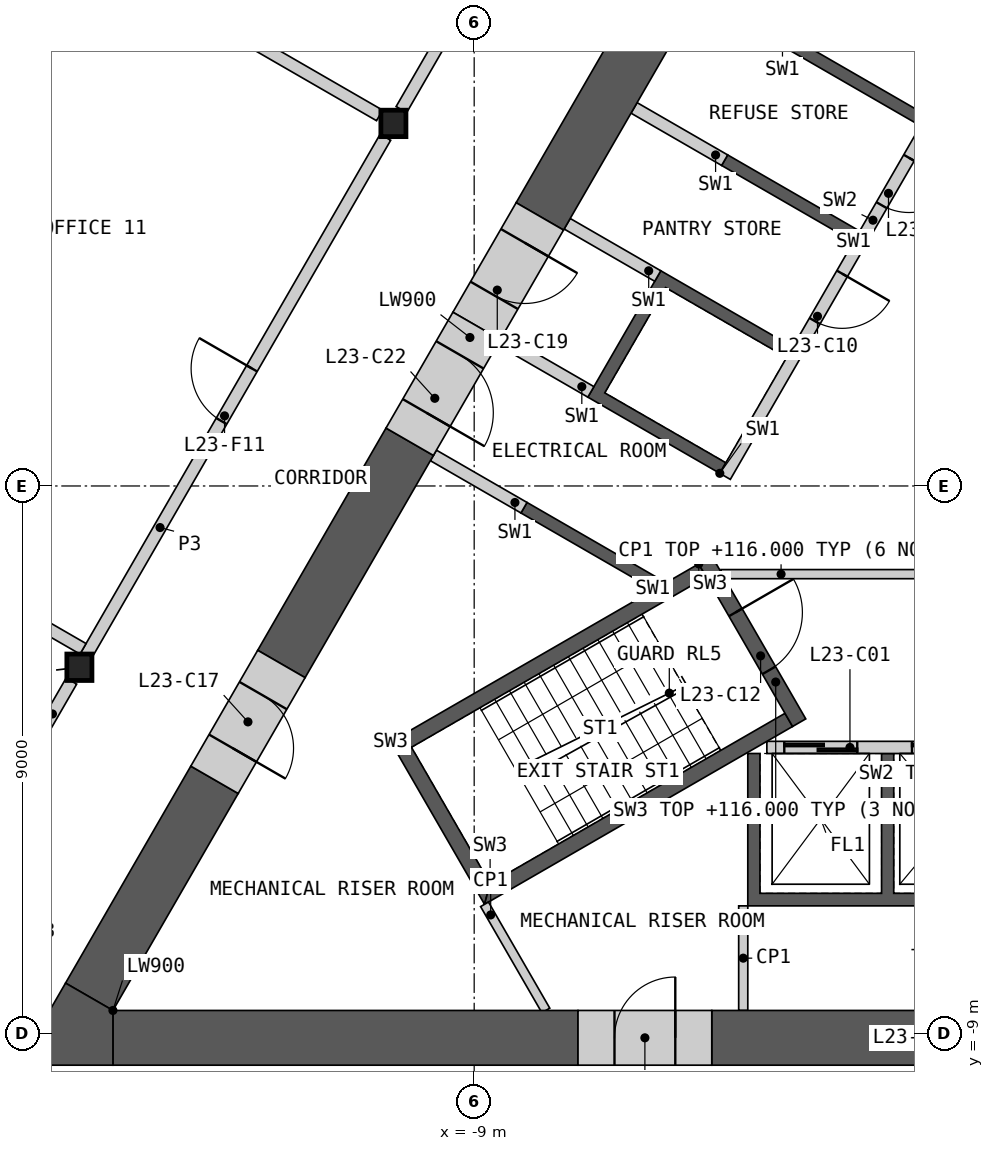
"""IFC4 building model, lengths in metres.
Left out: names, types, materials, properties, quantities, classifications, styles, units other than length and angle.
Written with IfcOpenShell. Run it as: python <this file> out.ifc"""

import sys

from ifc_helpers import new_model, si_unit, direction, frame, frame_2d, origin, origin_2d, place, context, subcontext, project, spatial, polyline, rectangle, i_section, outline, extrude, element, fill, save


model = new_model("IFC4")
c1 = context("Model", 3, precision=1e-05, world=origin(), true_north=direction((0.0, 1.0)))
c2 = subcontext(c1, "Body", "Model", "MODEL_VIEW")
j1 = project(units=[si_unit("LENGTHUNIT", "METRE"), si_unit("PLANEANGLEUNIT", "RADIAN")], contexts=[c1])
p1 = place(None, origin())
s1 = spatial("IfcSite", under=j1, at=p1, CompositionType="ELEMENT")
p2 = place(p1, origin())
s2 = spatial("IfcBuilding", under=s1, at=p2, CompositionType="ELEMENT")
p3 = place(p2, frame((0.0, 0.0, 112.2)))
s3 = spatial("IfcBuildingStorey", under=s2, at=p3, CompositionType="ELEMENT", Elevation=112.2)
for number, where, z_axis, x_axis in (
    (1, (-10.328, 5.963, 0.0), (0.0, 0.0, 1.0), (1.0, 0.0, 0.0)),
    (2, (-15.493, -2.982, 0.0), (0.0, 0.0, 1.0), (1.0, 0.0, 0.0)),
):
    element("IfcColumn", number, at=place(p3, frame(where, z_axis=z_axis, x_axis=x_axis)), inside=s3, PredefinedType="COLUMN", context=c2, shape_type="SweptSolid", body=[
        extrude(i_section(OverallWidth=0.412, OverallDepth=0.435, WebThickness=0.036, FlangeThickness=0.057, at=origin_2d()), origin(), (0.0, 0.0, 1.0), 4.2),
    ])
p4 = place(p3, origin())
e3 = element("IfcWall", 3, at=p4, inside=s3, PredefinedType="SHEAR", context=c2, shape_type="SweptSolid", body=[
    extrude(outline(polyline([(4.5, -4.4), (4.5, -6.906), (-4.5, -6.906), (-4.5, -4.4), (-4.3, -4.4), (-4.3, -6.7), (-2.3, -6.7), (-2.3, -4.4), (-2.1, -4.4), (-2.1, -6.7), (-0.1, -6.7), (-0.1, -4.4), (0.1, -4.4), (0.1, -6.7), (2.1, -6.7), (2.1, -4.4), (2.3, -4.4), (2.3, -6.7), (4.3, -6.7), (4.3, -4.4), (4.5, -4.4)])), origin(), (0.0, 0.0, 1.0), 3.8),
])
p5 = place(p3, frame((-4.187, -4.3, 0.0), z_axis=(0.0, 0.0, 1.0), x_axis=(1.0, 0.0, 0.0)))
e4 = element("IfcWall", 4, at=p5, inside=s3, PredefinedType="SOLIDWALL", context=c2, shape_type="SweptSolid", body=[
    extrude(rectangle(XDim=8.373, YDim=0.2, at=frame_2d((4.187, 0.0))), origin(), (0.0, 0.0, 1.0), 3.8),
])
p6 = place(p5, frame((0.287, 0.0, 0.0)))
e5 = element("IfcOpeningElement", 5, at=p6, cuts=e4, PredefinedType="OPENING", context=c2, shape_type="SweptSolid", body=[
    extrude(rectangle(XDim=1.2, YDim=2.1, at=frame_2d((0.6, 1.05))), frame((0.0, 0.11, 0.0), z_axis=(0.0, -1.0, 0.0), x_axis=(1.0, 0.0, 0.0)), (0.0, 0.0, 1.0), 0.22),
])
p7 = place(p5, frame((2.387, 0.0, 0.0)))
e6 = element("IfcOpeningElement", 6, at=p7, cuts=e4, PredefinedType="OPENING", context=c2, shape_type="SweptSolid", body=[
    extrude(rectangle(XDim=1.4, YDim=2.1, at=frame_2d((0.7, 1.05))), frame((0.0, 0.11, 0.0), z_axis=(0.0, -1.0, 0.0), x_axis=(1.0, 0.0, 0.0)), (0.0, 0.0, 1.0), 0.22),
])
p8 = place(p5, frame((4.737, 0.0, 0.0)))
e7 = element("IfcOpeningElement", 7, at=p8, cuts=e4, PredefinedType="OPENING", context=c2, shape_type="SweptSolid", body=[
    extrude(rectangle(XDim=1.1, YDim=2.1, at=frame_2d((0.55, 1.05))), frame((0.0, 0.11, 0.0), z_axis=(0.0, -1.0, 0.0), x_axis=(1.0, 0.0, 0.0)), (0.0, 0.0, 1.0), 0.22),
])
p9 = place(p5, frame((6.887, 0.0, 0.0)))
e8 = element("IfcOpeningElement", 8, at=p9, cuts=e4, PredefinedType="OPENING", context=c2, shape_type="SweptSolid", body=[
    extrude(rectangle(XDim=1.2, YDim=2.1, at=frame_2d((0.6, 1.05))), frame((0.0, 0.11, 0.0), z_axis=(0.0, -1.0, 0.0), x_axis=(1.0, 0.0, 0.0)), (0.0, 0.0, 1.0), 0.22),
])
p10 = place(p3, origin())
e9 = element("IfcWall", 9, at=p10, inside=s3, PredefinedType="SHEAR", context=c2, shape_type="SweptSolid", body=[
    extrude(outline(polyline([(-6.061, -1.697), (-8.231, -0.444), (-8.131, -0.271), (-5.96, -1.524), (-6.061, -1.697)])), origin(), (0.0, 0.0, 1.0), 3.8),
])
p11 = place(p3, origin())
e10 = element("IfcWall", 10, at=p11, inside=s3, PredefinedType="SHEAR", context=c2, shape_type="SweptSolid", body=[
    extrude(outline(polyline([(-4.96, 0.208), (-7.131, 1.461), (-5.931, 3.54), (-3.76, 2.287), (-3.861, 2.113), (-5.852, 3.263), (-6.852, 1.531), (-4.861, 0.381), (-4.96, 0.208)])), origin(), (0.0, 0.0, 1.0), 3.8),
])
p12 = place(p3, origin())
e11 = element("IfcWall", 11, at=p12, inside=s3, PredefinedType="SHEAR", context=c2, shape_type="SweptSolid", body=[
    extrude(outline(polyline([(-2.76, 4.019), (-4.931, 5.272), (-4.831, 5.445), (-2.66, 4.192), (-2.76, 4.019)])), origin(), (0.0, 0.0, 1.0), 3.8),
])
p13 = place(p3, origin())
e12 = element("IfcWall", 12, at=p13, inside=s3, PredefinedType="SHEAR", context=c2, shape_type="SweptSolid", body=[
    extrude(outline(polyline([(-3.731, 7.35), (-1.561, 6.097), (-1.66, 5.924), (-3.831, 7.177), (-3.731, 7.35)])), origin(), (0.0, 0.0, 1.0), 3.8),
])
p14 = place(p3, frame((-1.631, 5.776, 0.0), z_axis=(0.0, 0.0, 1.0), x_axis=(-0.499992876559, -0.866029516466, 0.0)))
e13 = element("IfcWall", 13, at=p14, inside=s3, PredefinedType="SOLIDWALL", context=c2, shape_type="SweptSolid", body=[
    extrude(rectangle(XDim=6.486, YDim=0.2, at=frame_2d((3.243, 0.0))), origin(), (0.0, 0.0, 1.0), 3.8),
])
p15 = place(p14, frame((0.437, 0.0, 0.0)))
e14 = element("IfcOpeningElement", 14, at=p15, cuts=e13, PredefinedType="OPENING", context=c2, shape_type="SweptSolid", body=[
    extrude(rectangle(XDim=0.9, YDim=2.1, at=frame_2d((0.45, 1.05))), frame((0.0, 0.11, 0.0), z_axis=(0.0, -1.0, 0.0), x_axis=(1.0, 0.0, 0.0)), (0.0, 0.0, 1.0), 0.22),
])
p16 = place(p14, frame((2.637, 0.0, 0.0)))
e15 = element("IfcOpeningElement", 15, at=p16, cuts=e13, PredefinedType="OPENING", context=c2, shape_type="SweptSolid", body=[
    extrude(rectangle(XDim=0.9, YDim=2.1, at=frame_2d((0.45, 1.05))), frame((0.0, 0.11, 0.0), z_axis=(0.0, -1.0, 0.0), x_axis=(1.0, 0.0, 0.0)), (0.0, 0.0, 1.0), 0.22),
])
p17 = place(p3, frame((-4.881, 5.358, 0.0), z_axis=(0.0, 0.0, 1.0), x_axis=(-0.866024871741, 0.500000921525, 0.0)))
e16 = element("IfcWall", 16, at=p17, inside=s3, PredefinedType="SHEAR", context=c2, shape_type="SweptSolid", body=[
    extrude(rectangle(XDim=1.72, YDim=0.2, at=frame_2d((0.86, 0.0))), origin(), (0.0, 0.0, 1.0), 3.8),
])
p18 = place(p3, frame((-5.981, 3.453, 0.0), z_axis=(0.0, 0.0, 1.0), x_axis=(-0.866060346521, 0.499939472521, 0.0)))
e17 = element("IfcWall", 17, at=p18, inside=s3, PredefinedType="SHEAR", context=c2, shape_type="SweptSolid", body=[
    extrude(rectangle(XDim=1.72, YDim=0.2, at=frame_2d((0.86, 0.0))), origin(), (0.0, 0.0, 1.0), 3.8),
])
for number, where, z_axis, x_axis in (
    (18, (-7.081, 1.548, 0.0), (0.0, 0.0, 1.0), (-0.866, 0.5, 0.0)),
    (19, (-8.181, -0.357, 0.0), (0.0, 0.0, 1.0), (-0.866, 0.5, 0.0)),
):
    element("IfcWall", number, at=place(p3, frame(where, z_axis=z_axis, x_axis=x_axis)), inside=s3, PredefinedType="SHEAR", context=c2, shape_type="SweptSolid", body=[
        extrude(rectangle(XDim=1.72, YDim=0.2, at=frame_2d((0.86, 0.0))), origin(), (0.0, 0.0, 1.0), 3.8),
    ])
p19 = place(p3, frame((-4.941, -1.45, 0.0), z_axis=(0.0, 0.0, 1.0), x_axis=(1.0, 0.0, 0.0)))
e20 = element("IfcWall", 20, at=p19, inside=s3, PredefinedType="PARTITIONING", context=c2, shape_type="SweptSolid", body=[
    extrude(rectangle(XDim=9.882, YDim=0.15, at=frame_2d((4.941, 0.0))), origin(), (0.0, 0.0, 1.0), 3.8),
])
p20 = place(p19, frame((4.391, 0.0, 0.0)))
e21 = element("IfcOpeningElement", 21, at=p20, cuts=e20, PredefinedType="OPENING", context=c2, shape_type="SweptSolid", body=[
    extrude(rectangle(XDim=1.1, YDim=2.1, at=frame_2d((0.55, 1.05))), frame((0.0, 0.085, 0.0), z_axis=(0.0, -1.0, 0.0), x_axis=(1.0, 0.0, 0.0)), (0.0, 0.0, 1.0), 0.17),
])
p21 = place(p3, origin())
e22 = element("IfcWall", 22, at=p21, inside=s3, PredefinedType="SHEAR", context=c2, shape_type="SweptSolid", body=[
    extrude(outline(polyline([(-5.307, -1.281), (-10.374, -4.206), (-10.032, -4.298), (-5.182, -1.498), (-5.307, -1.281)])), origin(), (0.0, 0.0, 1.0), 3.8),
])
p22 = place(p3, origin())
e23 = element("IfcWall", 23, at=p22, inside=s3, PredefinedType="SHEAR", context=c2, shape_type="SweptSolid", body=[
    extrude(outline(polyline([(-10.374, -4.206), (-8.83, -6.881), (-8.738, -6.539), (-10.032, -4.298), (-10.374, -4.206)])), origin(), (0.0, 0.0, 1.0), 3.8),
])
p23 = place(p3, origin())
e24 = element("IfcWall", 24, at=p23, inside=s3, PredefinedType="SHEAR", context=c2, shape_type="SweptSolid", body=[
    extrude(outline(polyline([(-8.738, -6.539), (-8.83, -6.881), (-3.763, -3.956), (-3.888, -3.739), (-8.738, -6.539)])), origin(), (0.0, 0.0, 1.0), 3.8),
])
p24 = place(p3, frame((-5.199, -1.219, 0.0), z_axis=(0.0, 0.0, 1.0), x_axis=(0.499982516597, -0.866035497597, 0.0)))
e25 = element("IfcWall", 25, at=p24, inside=s3, PredefinedType="SHEAR", context=c2, shape_type="SweptSolid", body=[
    extrude(rectangle(XDim=3.088, YDim=0.25, at=frame_2d((1.544, 0.0))), origin(), (0.0, 0.0, 1.0), 3.8),
])
p25 = place(p24, frame((0.994, 0.0, 0.0)))
e26 = element("IfcOpeningElement", 26, at=p25, cuts=e25, PredefinedType="OPENING", context=c2, shape_type="SweptSolid", body=[
    extrude(rectangle(XDim=1.1, YDim=2.1, at=frame_2d((0.55, 1.05))), frame((0.0, 0.135, 0.0), z_axis=(0.0, -1.0, 0.0), x_axis=(1.0, 0.0, 0.0)), (0.0, 0.0, 1.0), 0.27),
])
p26 = place(p3, frame((-4.575, -6.906, 0.0), z_axis=(0.0, 0.0, 1.0), x_axis=(0.0, -1.0, 0.0)))
e27 = element("IfcWall", 27, at=p26, inside=s3, PredefinedType="PARTITIONING", context=c2, shape_type="SweptSolid", body=[
    extrude(rectangle(XDim=1.72, YDim=0.15, at=frame_2d((0.86, 0.0))), origin(), (0.0, 0.0, 1.0), 3.8),
])
p27 = place(p3, frame((-8.83, -6.881, 0.0), z_axis=(0.0, 0.0, 1.0), x_axis=(0.500085890408, -0.865975809255, 0.0)))
e28 = element("IfcWall", 28, at=p27, inside=s3, PredefinedType="PARTITIONING", context=c2, shape_type="SweptSolid", body=[
    extrude(rectangle(XDim=2.016, YDim=0.15, at=frame_2d((1.008, 0.0))), origin(), (0.0, 0.0, 1.0), 3.8),
])
p28 = place(p3, frame((-14.941, -9.076, 0.0), z_axis=(0.0, 0.0, 1.0), x_axis=(1.0, 0.0, 0.0)))
e29 = element("IfcWall", 29, at=p28, inside=s3, PredefinedType="SHEAR", context=c2, shape_type="SweptSolid", body=[
    extrude(rectangle(XDim=7.649, YDim=0.9, at=frame_2d((3.824, 0.0))), origin(), (0.0, 0.0, 1.0), 3.8),
])
p29 = place(p3, frame((-5.093, -9.076, 0.0), z_axis=(0.0, 0.0, 1.0), x_axis=(1.0, 0.0, 0.0)))
e30 = element("IfcWall", 30, at=p29, inside=s3, PredefinedType="SHEAR", context=c2, shape_type="SweptSolid", body=[
    extrude(rectangle(XDim=3.992, YDim=0.9, at=frame_2d((1.996, 0.0))), origin(), (0.0, 0.0, 1.0), 3.8),
])
p30 = place(p3, frame((-3.55, 12.004, 0.0), z_axis=(0.0, 0.0, 1.0), x_axis=(-0.499993245289, -0.866029303583, 0.0)))
e31 = element("IfcWall", 31, at=p30, inside=s3, PredefinedType="SHEAR", context=c2, shape_type="SweptSolid", body=[
    extrude(rectangle(XDim=8.741, YDim=0.9, at=frame_2d((4.37, 0.0))), origin(), (0.0, 0.0, 1.0), 3.8),
])
p31 = place(p3, frame((-10.06, 0.728, 0.0), z_axis=(0.0, 0.0, 1.0), x_axis=(-0.500021220092, -0.866013152012, 0.0)))
e32 = element("IfcWall", 32, at=p31, inside=s3, PredefinedType="SHEAR", context=c2, shape_type="SweptSolid", body=[
    extrude(rectangle(XDim=4.22, YDim=0.9, at=frame_2d((2.11, 0.0))), origin(), (0.0, 0.0, 1.0), 3.8),
])
p32 = place(p3, frame((-13.271, -4.833, 0.0), z_axis=(0.0, 0.0, 1.0), x_axis=(-0.499994272862, -0.866028710324, 0.0)))
e33 = element("IfcWall", 33, at=p32, inside=s3, PredefinedType="SHEAR", context=c2, shape_type="SweptSolid", body=[
    extrude(rectangle(XDim=4.121, YDim=0.9, at=frame_2d((2.06, 0.0))), origin(), (0.0, 0.0, 1.0), 3.8),
])
p33 = place(p3, origin())
e34 = element("IfcWall", 34, at=p33, inside=s3, PredefinedType="SHEAR", context=c2, shape_type="SweptSolid", body=[
    extrude(outline(polyline([(-14.941, -8.626), (-14.941, -9.526), (-16.5, -9.526), (-15.721, -8.176), (-14.941, -8.626)])), origin(), (0.0, 0.0, 1.0), 3.8),
])
p34 = place(p3, frame((-12.171, -2.927, 0.0), z_axis=(0.0, 0.0, 1.0), x_axis=(-0.499946605688, -0.86605622881, 0.0)))
e35 = element("IfcWall", 35, at=p34, inside=s3, PredefinedType="SHEAR", context=c2, shape_type="SweptSolid", body=[
    extrude(rectangle(XDim=2.2, YDim=0.9, at=frame_2d((1.1, 0.0))), origin(), (0.0, 0.0, 1.0), 3.8),
])
p35 = place(p34, frame((0.6, 0.0, 0.0)))
e36 = element("IfcOpeningElement", 36, at=p35, cuts=e35, PredefinedType="OPENING", context=c2, shape_type="SweptSolid", body=[
    extrude(rectangle(XDim=1.0, YDim=2.1, at=frame_2d((0.5, 1.05))), frame((0.0, 0.46, 0.0), z_axis=(0.0, -1.0, 0.0), x_axis=(1.0, 0.0, 0.0)), (0.0, 0.0, 1.0), 0.92),
])
p36 = place(p3, frame((-7.92, 4.434, 0.0), z_axis=(0.0, 0.0, 1.0), x_axis=(-0.499939227269, -0.866060488094, 0.0)))
e37 = element("IfcWall", 37, at=p36, inside=s3, PredefinedType="SHEAR", context=c2, shape_type="SweptSolid", body=[
    extrude(rectangle(XDim=2.08, YDim=0.9, at=frame_2d((1.04, 0.0))), origin(), (0.0, 0.0, 1.0), 3.8),
])
p37 = place(p36, frame((0.5, 0.0, 0.0)))
e38 = element("IfcOpeningElement", 38, at=p37, cuts=e37, PredefinedType="OPENING", context=c2, shape_type="SweptSolid", body=[
    extrude(rectangle(XDim=1.0, YDim=2.1, at=frame_2d((0.5, 1.05))), frame((0.0, 0.46, 0.0), z_axis=(0.0, -1.0, 0.0), x_axis=(1.0, 0.0, 0.0)), (0.0, 0.0, 1.0), 0.92),
])
p38 = place(p3, frame((-7.292, -9.076, 0.0), z_axis=(0.0, 0.0, 1.0), x_axis=(1.0, 0.0, 0.0)))
e39 = element("IfcWall", 39, at=p38, inside=s3, PredefinedType="SHEAR", context=c2, shape_type="SweptSolid", body=[
    extrude(rectangle(XDim=2.2, YDim=0.9, at=frame_2d((1.1, 0.0))), origin(), (0.0, 0.0, 1.0), 3.8),
])
p39 = place(p38, frame((0.6, 0.0, 0.0)))
e40 = element("IfcOpeningElement", 40, at=p39, cuts=e39, PredefinedType="OPENING", context=c2, shape_type="SweptSolid", body=[
    extrude(rectangle(XDim=1.0, YDim=2.1, at=frame_2d((0.5, 1.05))), frame((0.0, 0.46, 0.0), z_axis=(0.0, -1.0, 0.0), x_axis=(1.0, 0.0, 0.0)), (0.0, 0.0, 1.0), 0.92),
])
p40 = place(p3, frame((-8.96, 2.633, 0.0), z_axis=(0.0, 0.0, 1.0), x_axis=(-0.50002983664, -0.866008176907, 0.0)))
e41 = element("IfcWall", 41, at=p40, inside=s3, PredefinedType="SHEAR", context=c2, shape_type="SweptSolid", body=[
    extrude(rectangle(XDim=2.2, YDim=0.9, at=frame_2d((1.1, 0.0))), origin(), (0.0, 0.0, 1.0), 3.8),
])
p41 = place(p40, frame((0.55, 0.0, 0.0)))
e42 = element("IfcOpeningElement", 42, at=p41, cuts=e41, PredefinedType="OPENING", context=c2, shape_type="SweptSolid", body=[
    extrude(rectangle(XDim=1.1, YDim=2.1, at=frame_2d((0.55, 1.05))), frame((0.0, 0.46, 0.0), z_axis=(0.0, -1.0, 0.0), x_axis=(1.0, 0.0, 0.0)), (0.0, 0.0, 1.0), 0.92),
])
p42 = place(p3, frame((-10.197, 6.19, 0.0), z_axis=(0.0, 0.0, 1.0), x_axis=(0.500012035596, 0.866018454918, 0.0)))
e43 = element("IfcWall", 43, at=p42, inside=s3, PredefinedType="PARTITIONING", context=c2, shape_type="SweptSolid", body=[
    extrude(rectangle(XDim=9.803, YDim=0.2, at=frame_2d((4.902, 0.0))), origin(), (0.0, 0.0, 1.0), 3.8),
])
p43 = place(p42, frame((1.851, 0.0, 0.0)))
e44 = element("IfcOpeningElement", 44, at=p43, cuts=e43, PredefinedType="OPENING", context=c2, shape_type="SweptSolid", body=[
    extrude(rectangle(XDim=1.0, YDim=2.1, at=frame_2d((0.5, 1.05))), frame((0.0, 0.11, 0.0), z_axis=(0.0, -1.0, 0.0), x_axis=(1.0, 0.0, 0.0)), (0.0, 0.0, 1.0), 0.22),
])
p44 = place(p3, frame((-15.402, -2.823, 0.0), z_axis=(0.0, 0.0, 1.0), x_axis=(0.500023237168, 0.866011987384, 0.0)))
e45 = element("IfcWall", 45, at=p44, inside=s3, PredefinedType="PARTITIONING", context=c2, shape_type="SweptSolid", body=[
    extrude(rectangle(XDim=9.883, YDim=0.2, at=frame_2d((4.942, 0.0))), origin(), (0.0, 0.0, 1.0), 3.8),
])
p45 = place(p44, frame((4.492, 0.0, 0.0)))
e46 = element("IfcOpeningElement", 46, at=p45, cuts=e45, PredefinedType="OPENING", context=c2, shape_type="SweptSolid", body=[
    extrude(rectangle(XDim=1.0, YDim=2.1, at=frame_2d((0.5, 1.05))), frame((0.0, 0.11, 0.0), z_axis=(0.0, -1.0, 0.0), x_axis=(1.0, 0.0, 0.0)), (0.0, 0.0, 1.0), 0.22),
])
p46 = place(p3, frame((-18.744, -8.613, 0.0), z_axis=(0.0, 0.0, 1.0), x_axis=(0.499997920671, 0.866026604282, 0.0)))
e47 = element("IfcWall", 47, at=p46, inside=s3, PredefinedType="PARTITIONING", context=c2, shape_type="SweptSolid", body=[
    extrude(rectangle(XDim=6.24, YDim=0.2, at=frame_2d((3.12, 0.0))), origin(), (0.0, 0.0, 1.0), 3.8),
])
p47 = place(p46, frame((2.67, 0.0, 0.0)))
e48 = element("IfcOpeningElement", 48, at=p47, cuts=e47, PredefinedType="OPENING", context=c2, shape_type="SweptSolid", body=[
    extrude(rectangle(XDim=1.0, YDim=2.1, at=frame_2d((0.5, 1.05))), frame((0.0, 0.11, 0.0), z_axis=(0.0, -1.0, 0.0), x_axis=(1.0, 0.0, 0.0)), (0.0, 0.0, 1.0), 0.22),
])
p48 = place(p3, frame((-26.636, 3.79, 0.0), z_axis=(0.0, 0.0, 1.0), x_axis=(0.866029074283, -0.499993642455, 0.0)))
e49 = element("IfcWall", 49, at=p48, inside=s3, PredefinedType="PARTITIONING", context=c2, shape_type="SweptSolid", body=[
    extrude(rectangle(XDim=12.936, YDim=0.2, at=frame_2d((6.468, 0.0))), origin(), (0.0, 0.0, 1.0), 2.885),
])
p49 = place(p3, frame((-21.536, 12.434, 0.0), z_axis=(0.0, 0.0, 1.0), x_axis=(0.86602461759, -0.500001361726, 0.0)))
e50 = element("IfcWall", 50, at=p49, inside=s3, PredefinedType="PARTITIONING", context=c2, shape_type="SweptSolid", body=[
    extrude(rectangle(XDim=12.679, YDim=0.2, at=frame_2d((6.34, 0.0))), origin(), (0.0, 0.0, 1.0), 2.885),
])
p50 = place(p6, origin())
e51 = element("IfcDoor", 51, at=p50, inside=s3, OperationType="SLIDING_TO_LEFT", PredefinedType="DOOR", context=c2, shape_type="SweptSolid", body=[
    extrude(rectangle(XDim=1.2, YDim=2.1, at=frame_2d((0.6, 1.05))), frame((0.0, 0.025, 0.0), z_axis=(0.0, -1.0, 0.0), x_axis=(1.0, 0.0, 0.0)), (0.0, 0.0, 1.0), 0.05),
])
fill(e5, e51)
p51 = place(p7, origin())
e52 = element("IfcDoor", 52, at=p51, inside=s3, OperationType="SLIDING_TO_LEFT", PredefinedType="DOOR", context=c2, shape_type="SweptSolid", body=[
    extrude(rectangle(XDim=1.4, YDim=2.1, at=frame_2d((0.7, 1.05))), frame((0.0, 0.025, 0.0), z_axis=(0.0, -1.0, 0.0), x_axis=(1.0, 0.0, 0.0)), (0.0, 0.0, 1.0), 0.05),
])
fill(e6, e52)
p52 = place(p15, origin())
e53 = element("IfcDoor", 53, at=p52, inside=s3, OperationType="SINGLE_SWING_LEFT", PredefinedType="DOOR", context=c2, shape_type="SweptSolid", body=[
    extrude(rectangle(XDim=0.9, YDim=2.1, at=frame_2d((0.45, 1.05))), frame((0.0, 0.025, 0.0), z_axis=(0.0, -1.0, 0.0), x_axis=(1.0, 0.0, 0.0)), (0.0, 0.0, 1.0), 0.05),
])
fill(e14, e53)
p53 = place(p16, origin())
e54 = element("IfcDoor", 54, at=p53, inside=s3, OperationType="SINGLE_SWING_LEFT", PredefinedType="DOOR", context=c2, shape_type="SweptSolid", body=[
    extrude(rectangle(XDim=0.9, YDim=2.1, at=frame_2d((0.45, 1.05))), frame((0.0, 0.025, 0.0), z_axis=(0.0, -1.0, 0.0), x_axis=(1.0, 0.0, 0.0)), (0.0, 0.0, 1.0), 0.05),
])
fill(e15, e54)
p54 = place(p25, origin())
e55 = element("IfcDoor", 55, at=p54, inside=s3, OperationType="SINGLE_SWING_LEFT", PredefinedType="DOOR", context=c2, shape_type="SweptSolid", body=[
    extrude(rectangle(XDim=1.1, YDim=2.1, at=frame_2d((0.55, 1.05))), frame((0.0, 0.025, 0.0), z_axis=(0.0, -1.0, 0.0), x_axis=(1.0, 0.0, 0.0)), (0.0, 0.0, 1.0), 0.05),
])
fill(e26, e55)
p55 = place(p35, origin())
e56 = element("IfcDoor", 56, at=p55, inside=s3, OperationType="SINGLE_SWING_RIGHT", PredefinedType="DOOR", context=c2, shape_type="SweptSolid", body=[
    extrude(rectangle(XDim=1.0, YDim=2.1, at=frame_2d((0.5, 1.05))), frame((0.0, 0.205, 0.0), z_axis=(0.0, -1.0, 0.0), x_axis=(1.0, 0.0, 0.0)), (0.0, 0.0, 1.0), 0.05),
])
fill(e36, e56)
p56 = place(p37, origin())
e57 = element("IfcDoor", 57, at=p56, inside=s3, OperationType="SINGLE_SWING_LEFT", PredefinedType="DOOR", context=c2, shape_type="SweptSolid", body=[
    extrude(rectangle(XDim=1.0, YDim=2.1, at=frame_2d((0.5, 1.05))), frame((0.0, 0.205, 0.0), z_axis=(0.0, -1.0, 0.0), x_axis=(1.0, 0.0, 0.0)), (0.0, 0.0, 1.0), 0.05),
])
fill(e38, e57)
p57 = place(p39, origin())
e58 = element("IfcDoor", 58, at=p57, inside=s3, OperationType="SINGLE_SWING_RIGHT", PredefinedType="DOOR", context=c2, shape_type="SweptSolid", body=[
    extrude(rectangle(XDim=1.0, YDim=2.1, at=frame_2d((0.5, 1.05))), frame((0.0, 0.205, 0.0), z_axis=(0.0, -1.0, 0.0), x_axis=(1.0, 0.0, 0.0)), (0.0, 0.0, 1.0), 0.05),
])
fill(e40, e58)
p58 = place(p41, origin())
e59 = element("IfcDoor", 59, at=p58, inside=s3, OperationType="SINGLE_SWING_RIGHT", PredefinedType="DOOR", context=c2, shape_type="SweptSolid", body=[
    extrude(rectangle(XDim=1.1, YDim=2.1, at=frame_2d((0.55, 1.05))), frame((0.0, 0.205, 0.0), z_axis=(0.0, -1.0, 0.0), x_axis=(1.0, 0.0, 0.0)), (0.0, 0.0, 1.0), 0.05),
])
fill(e42, e59)
p59 = place(p45, origin())
e60 = element("IfcDoor", 60, at=p59, inside=s3, OperationType="SINGLE_SWING_RIGHT", PredefinedType="DOOR", context=c2, shape_type="SweptSolid", body=[
    extrude(rectangle(XDim=1.0, YDim=2.1, at=frame_2d((0.5, 1.05))), frame((0.0, 0.025, 0.0), z_axis=(0.0, -1.0, 0.0), x_axis=(1.0, 0.0, 0.0)), (0.0, 0.0, 1.0), 0.05),
])
fill(e46, e60)
save(model, sys.argv[1])
